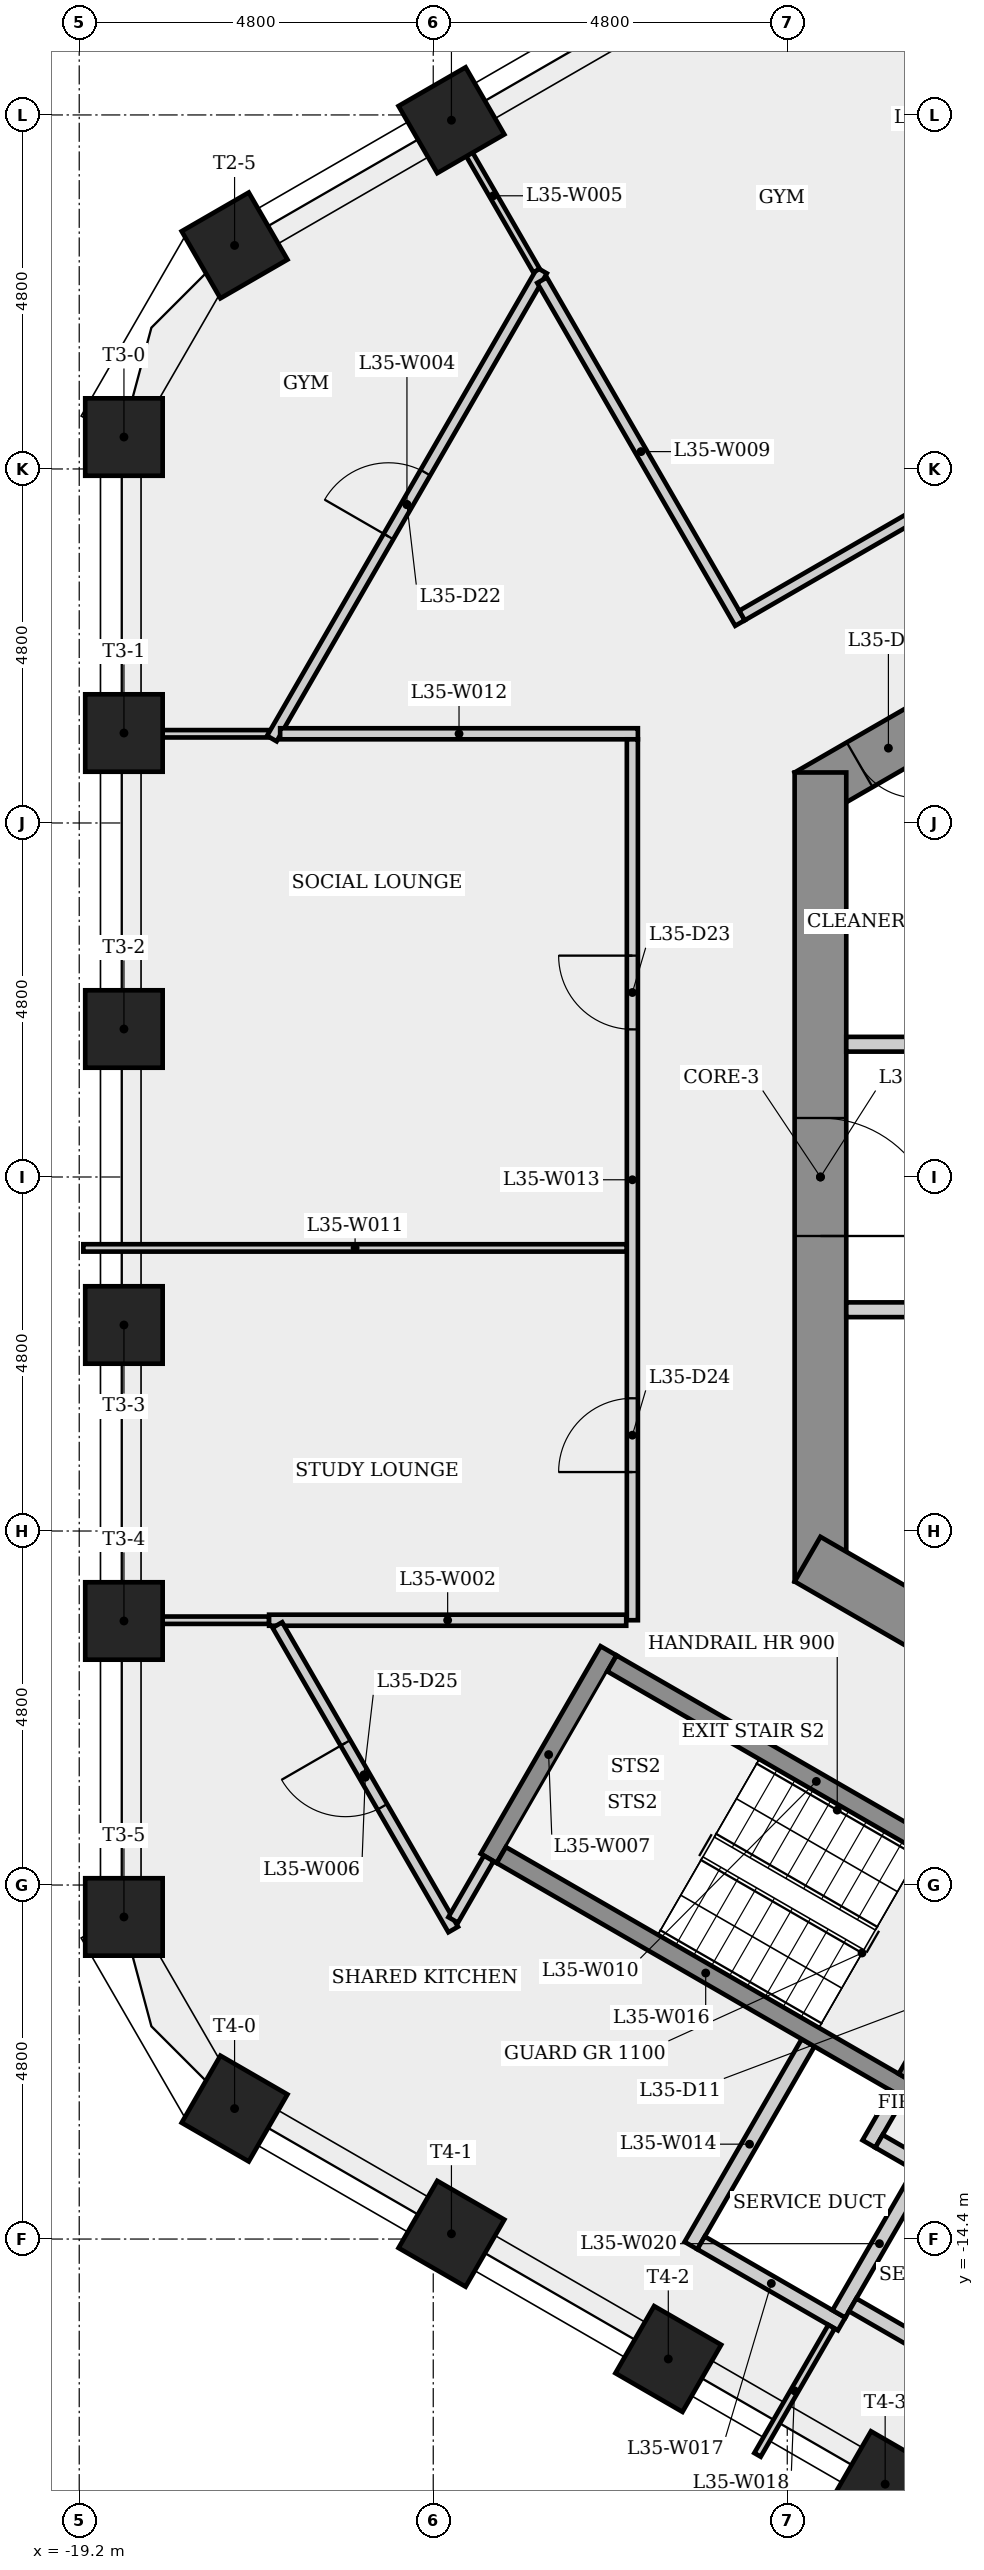
"""IFC4 building model, lengths in metres.
Left out: names, types, materials, properties, quantities, classifications, styles, units other than length and angle.
Written with IfcOpenShell. Run it as: python <this file> out.ifc"""

import sys

from ifc_helpers import new_model, si_unit, direction, frame, frame_2d, origin, origin_2d, place, context, subcontext, project, spatial, rectangle, extrude, element, fill, save


model = new_model("IFC4")
c1 = context("Model", 3, precision=1e-05, world=origin(), true_north=direction((0.0, 1.0)))
c2 = subcontext(c1, "Body", "Model", "MODEL_VIEW")
j1 = project(units=[si_unit("LENGTHUNIT", "METRE"), si_unit("PLANEANGLEUNIT", "RADIAN")], contexts=[c1])
p1 = place(None, origin())
s1 = spatial("IfcSite", under=j1, at=p1, CompositionType="ELEMENT")
p2 = place(p1, origin())
s2 = spatial("IfcBuilding", under=s1, at=p2, CompositionType="ELEMENT")
p3 = place(p2, frame((0.0, 0.0, 132.5)))
s3 = spatial("IfcBuildingStorey", under=s2, at=p3, CompositionType="ELEMENT", Elevation=132.5)
p4 = place(p3, frame((0.175, 10.667, 0.0), z_axis=(0.0, 0.0, 1.0), x_axis=(-0.866023993627, -0.500002442456, 0.0)))
e1 = element("IfcWall", 1, at=p4, inside=s3, PredefinedType="SHEAR", context=c2, shape_type="SweptSolid", body=[
    extrude(rectangle(XDim=10.97, YDim=0.7, at=frame_2d((5.485, 0.0))), origin(), (0.0, 0.0, 1.0), 3.4),
])
p5 = place(p4, frame((9.254, 0.0, 0.0)))
e2 = element("IfcOpeningElement", 2, at=p5, cuts=e1, PredefinedType="OPENING", context=c2, shape_type="SweptSolid", body=[
    extrude(rectangle(XDim=0.9, YDim=2.1, at=frame_2d((0.45, 1.05))), frame((0.0, 0.36, 0.0), z_axis=(0.0, -1.0, 0.0), x_axis=(1.0, 0.0, 0.0)), (0.0, 0.0, 1.0), 0.72),
])
p6 = place(p4, frame((2.033, 0.0, 0.0)))
e3 = element("IfcOpeningElement", 3, at=p6, cuts=e1, PredefinedType="OPENING", context=c2, shape_type="SweptSolid", body=[
    extrude(rectangle(XDim=0.9, YDim=2.1, at=frame_2d((0.45, 1.05))), frame((0.0, 0.36, 0.0), z_axis=(0.0, -1.0, 0.0), x_axis=(1.0, 0.0, 0.0)), (0.0, 0.0, 1.0), 0.72),
])
p7 = place(p3, frame((-9.15, 5.485, 0.0), z_axis=(0.0, 0.0, 1.0), x_axis=(0.0, -1.0, 0.0)))
e4 = element("IfcWall", 4, at=p7, inside=s3, PredefinedType="SHEAR", context=c2, shape_type="SweptSolid", body=[
    extrude(rectangle(XDim=10.97, YDim=0.7, at=frame_2d((5.485, 0.0))), origin(), (0.0, 0.0, 1.0), 3.4),
])
p8 = place(p7, frame((4.685, 0.0, 0.0)))
e5 = element("IfcOpeningElement", 5, at=p8, cuts=e4, PredefinedType="OPENING", context=c2, shape_type="SweptSolid", body=[
    extrude(rectangle(XDim=1.6, YDim=2.1, at=frame_2d((0.8, 1.05))), frame((0.0, 0.36, 0.0), z_axis=(0.0, -1.0, 0.0), x_axis=(1.0, 0.0, 0.0)), (0.0, 0.0, 1.0), 0.72),
])
p9 = place(p3, frame((-9.325, -5.182, 0.0), z_axis=(0.0, 0.0, 1.0), x_axis=(0.866023993627, -0.500002442456, 0.0)))
e6 = element("IfcWall", 6, at=p9, inside=s3, PredefinedType="SHEAR", context=c2, shape_type="SweptSolid", body=[
    extrude(rectangle(XDim=10.97, YDim=0.7, at=frame_2d((5.485, 0.0))), origin(), (0.0, 0.0, 1.0), 3.4),
])
p10 = place(p9, frame((2.239, 0.0, 0.0)))
e7 = element("IfcOpeningElement", 7, at=p10, cuts=e6, PredefinedType="OPENING", context=c2, shape_type="SweptSolid", body=[
    extrude(rectangle(XDim=0.9, YDim=2.1, at=frame_2d((0.45, 1.05))), frame((0.0, 0.36, 0.0), z_axis=(0.0, -1.0, 0.0), x_axis=(1.0, 0.0, 0.0)), (0.0, 0.0, 1.0), 0.72),
])
p11 = place(p9, frame((8.96, 0.0, 0.0)))
e8 = element("IfcOpeningElement", 8, at=p11, cuts=e6, PredefinedType="OPENING", context=c2, shape_type="SweptSolid", body=[
    extrude(rectangle(XDim=0.9, YDim=2.1, at=frame_2d((0.45, 1.05))), frame((0.0, 0.36, 0.0), z_axis=(0.0, -1.0, 0.0), x_axis=(1.0, 0.0, 0.0)), (0.0, 0.0, 1.0), 0.72),
])
for number, where, z_axis, x_axis in (
    (9, (-14.153, 14.329, 0.0), (0.0, 0.0, 1.0), (-0.5, 0.866, 0.0)),
    (10, (-17.094, 12.631, 0.0), (0.0, 0.0, 1.0), (-0.5, 0.866, 0.0)),
    (11, (-18.594, 10.033, 0.0), (0.0, 0.0, 1.0), (-1.0, 0.0, 0.0)),
    (12, (-18.594, 6.02, 0.0), (0.0, 0.0, 1.0), (-1.0, 0.0, 0.0)),
    (13, (-18.594, 2.007, 0.0), (0.0, 0.0, 1.0), (-1.0, 0.0, 0.0)),
    (14, (-18.594, -2.007, 0.0), (0.0, 0.0, 1.0), (-1.0, 0.0, 0.0)),
    (15, (-18.594, -6.02, 0.0), (0.0, 0.0, 1.0), (-1.0, 0.0, 0.0)),
    (16, (-18.594, -10.033, 0.0), (0.0, 0.0, 1.0), (-1.0, 0.0, 0.0)),
    (17, (-17.094, -12.631, 0.0), (0.0, 0.0, 1.0), (-0.5, -0.866, 0.0)),
    (18, (-14.153, -14.329, 0.0), (0.0, 0.0, 1.0), (-0.5, -0.866, 0.0)),
    (19, (-11.213, -16.026, 0.0), (0.0, 0.0, 1.0), (-0.5, -0.866, 0.0)),
    (20, (-8.273, -17.724, 0.0), (0.0, 0.0, 1.0), (-0.5, -0.866, 0.0)),
):
    element("IfcColumn", number, at=place(p3, frame(where, z_axis=z_axis, x_axis=x_axis)), inside=s3, PredefinedType="COLUMN", context=c2, shape_type="SweptSolid", body=[
        extrude(rectangle(XDim=1.05, YDim=1.05, at=origin_2d()), origin(), (0.0, 0.0, 1.0), 3.4),
    ])
p12 = place(p3, frame((-16.626, -6.01, 0.0), z_axis=(0.0, 0.0, 1.0), x_axis=(-1.0, 0.0, 0.0)))
e21 = element("IfcWall", 21, at=p12, inside=s3, PredefinedType="PARTITIONING", context=c2, shape_type="SweptSolid", body=[
    extrude(rectangle(XDim=1.998, YDim=0.1, at=frame_2d((0.999, 0.0))), origin(), (0.0, 0.0, 1.0), 3.0),
])
p13 = place(p3, frame((-16.626, -6.01, 0.0), z_axis=(0.0, 0.0, 1.0), x_axis=(1.0, 0.0, 0.0)))
e22 = element("IfcWall", 22, at=p13, inside=s3, PredefinedType="PARTITIONING", context=c2, shape_type="SweptSolid", body=[
    extrude(rectangle(XDim=4.842, YDim=0.15, at=frame_2d((2.421, 0.0))), origin(), (0.0, 0.0, 1.0), 3.0),
])
p14 = place(p3, frame((-16.626, 6.01, 0.0), z_axis=(0.0, 0.0, 1.0), x_axis=(-1.0, 0.0, 0.0)))
e23 = element("IfcWall", 23, at=p14, inside=s3, PredefinedType="PARTITIONING", context=c2, shape_type="SweptSolid", body=[
    extrude(rectangle(XDim=1.998, YDim=0.1, at=frame_2d((0.999, 0.0))), origin(), (0.0, 0.0, 1.0), 3.0),
])
p15 = place(p3, frame((-16.588, 5.945, 0.0), z_axis=(0.0, 0.0, 1.0), x_axis=(0.500006094381, 0.866021885163, 0.0)))
e24 = element("IfcWall", 24, at=p15, inside=s3, PredefinedType="PARTITIONING", context=c2, shape_type="SweptSolid", body=[
    extrude(rectangle(XDim=7.327, YDim=0.15, at=frame_2d((3.663, 0.0))), origin(), (0.0, 0.0, 1.0), 3.0),
])
p16 = place(p15, frame((3.163, 0.0, 0.0)))
e25 = element("IfcOpeningElement", 25, at=p16, cuts=e24, PredefinedType="OPENING", context=c2, shape_type="SweptSolid", body=[
    extrude(rectangle(XDim=1.0, YDim=2.1, at=frame_2d((0.5, 1.05))), frame((0.0, 0.085, 0.0), z_axis=(0.0, -1.0, 0.0), x_axis=(1.0, 0.0, 0.0)), (0.0, 0.0, 1.0), 0.17),
])
p17 = place(p3, frame((-14.171, 14.318, 0.0), z_axis=(0.0, 0.0, 1.0), x_axis=(0.500017137554, -0.866015509187, 0.0)))
e26 = element("IfcWall", 26, at=p17, inside=s3, PredefinedType="PARTITIONING", context=c2, shape_type="SweptSolid", body=[
    extrude(rectangle(XDim=2.343, YDim=0.1, at=frame_2d((1.171, 0.0))), origin(), (0.0, 0.0, 1.0), 3.0),
])
p18 = place(p3, frame((-14.13, -10.203, 0.0), z_axis=(0.0, 0.0, 1.0), x_axis=(-0.500000266875, 0.866025249704, 0.0)))
e27 = element("IfcWall", 27, at=p18, inside=s3, PredefinedType="PARTITIONING", context=c2, shape_type="SweptSolid", body=[
    extrude(rectangle(XDim=4.767, YDim=0.15, at=frame_2d((2.384, 0.0))), origin(), (0.0, 0.0, 1.0), 3.0),
])
p19 = place(p18, frame((1.921, 0.0, 0.0)))
e28 = element("IfcOpeningElement", 28, at=p19, cuts=e27, PredefinedType="OPENING", context=c2, shape_type="SweptSolid", body=[
    extrude(rectangle(XDim=1.0, YDim=2.1, at=frame_2d((0.5, 1.05))), frame((0.0, 0.085, 0.0), z_axis=(0.0, -1.0, 0.0), x_axis=(1.0, 0.0, 0.0)), (0.0, 0.0, 1.0), 0.17),
])
p20 = place(p3, frame((-13.648, -9.239, 0.0), z_axis=(0.0, 0.0, 1.0), x_axis=(0.500017246033, 0.866015446554, 0.0)))
e29 = element("IfcWall", 29, at=p20, inside=s3, PredefinedType="SHEAR", context=c2, shape_type="SweptSolid", body=[
    extrude(rectangle(XDim=3.25, YDim=0.25, at=frame_2d((1.625, 0.0))), origin(), (0.0, 0.0, 1.0), 3.0),
])
p21 = place(p3, frame((-13.648, -9.239, 0.0), z_axis=(0.0, 0.0, 1.0), x_axis=(-0.500226934229, -0.865894343596, 0.0)))
e30 = element("IfcWall", 30, at=p21, inside=s3, PredefinedType="PARTITIONING", context=c2, shape_type="SweptSolid", body=[
    extrude(rectangle(XDim=0.963, YDim=0.15, at=frame_2d((0.482, 0.0))), origin(), (0.0, 0.0, 1.0), 3.0),
])
p22 = place(p3, frame((-12.925, 12.16, 0.0), z_axis=(0.0, 0.0, 1.0), x_axis=(0.500022974468, -0.866012139063, 0.0)))
e31 = element("IfcWall", 31, at=p22, inside=s3, PredefinedType="PARTITIONING", context=c2, shape_type="SweptSolid", body=[
    extrude(rectangle(XDim=5.368, YDim=0.15, at=frame_2d((2.684, 0.0))), origin(), (0.0, 0.0, 1.0), 3.0),
])
p23 = place(p3, frame((-11.977, -6.595, 0.0), z_axis=(0.0, 0.0, 1.0), x_axis=(0.866025499775, -0.499999833739, 0.0)))
e32 = element("IfcWall", 32, at=p23, inside=s3, PredefinedType="SHEAR", context=c2, shape_type="SweptSolid", body=[
    extrude(rectangle(XDim=6.4, YDim=0.25, at=frame_2d((3.2, 0.0))), origin(), (0.0, 0.0, 1.0), 3.0),
])
p24 = place(p23, frame((5.025, 0.0, 0.0)))
e33 = element("IfcOpeningElement", 33, at=p24, cuts=e32, PredefinedType="OPENING", context=c2, shape_type="SweptSolid", body=[
    extrude(rectangle(XDim=1.0, YDim=2.1, at=frame_2d((0.5, 1.05))), frame((0.0, 0.135, 0.0), z_axis=(0.0, -1.0, 0.0), x_axis=(1.0, 0.0, 0.0)), (0.0, 0.0, 1.0), 0.27),
])
p25 = place(p3, frame((-11.775, -0.961, 0.0), z_axis=(0.0, 0.0, 1.0), x_axis=(-1.0, 0.0, 0.0)))
e34 = element("IfcWall", 34, at=p25, inside=s3, PredefinedType="PARTITIONING", context=c2, shape_type="SweptSolid", body=[
    extrude(rectangle(XDim=7.369, YDim=0.1, at=frame_2d((3.685, 0.0))), origin(), (0.0, 0.0, 1.0), 3.0),
])
p26 = place(p3, frame((-11.625, 6.01, 0.0), z_axis=(0.0, 0.0, 1.0), x_axis=(-1.0, 0.0, 0.0)))
e35 = element("IfcWall", 35, at=p26, inside=s3, PredefinedType="PARTITIONING", context=c2, shape_type="SweptSolid", body=[
    extrude(rectangle(XDim=4.851, YDim=0.15, at=frame_2d((2.425, 0.0))), origin(), (0.0, 0.0, 1.0), 3.0),
])
p27 = place(p3, frame((-11.7, -6.01, 0.0), z_axis=(0.0, 0.0, 1.0), x_axis=(0.0, 1.0, 0.0)))
e36 = element("IfcWall", 36, at=p27, inside=s3, PredefinedType="PARTITIONING", context=c2, shape_type="SweptSolid", body=[
    extrude(rectangle(XDim=11.944, YDim=0.15, at=frame_2d((5.972, 0.0))), origin(), (0.0, 0.0, 1.0), 3.0),
])
p28 = place(p27, frame((8.011, 0.0, 0.0)))
e37 = element("IfcOpeningElement", 37, at=p28, cuts=e36, PredefinedType="OPENING", context=c2, shape_type="SweptSolid", body=[
    extrude(rectangle(XDim=1.0, YDim=2.1, at=frame_2d((0.5, 1.05))), frame((0.0, 0.085, 0.0), z_axis=(0.0, -1.0, 0.0), x_axis=(1.0, 0.0, 0.0)), (0.0, 0.0, 1.0), 0.17),
])
p29 = place(p27, frame((2.009, 0.0, 0.0)))
e38 = element("IfcOpeningElement", 38, at=p29, cuts=e36, PredefinedType="OPENING", context=c2, shape_type="SweptSolid", body=[
    extrude(rectangle(XDim=1.0, YDim=2.1, at=frame_2d((0.5, 1.05))), frame((0.0, 0.085, 0.0), z_axis=(0.0, -1.0, 0.0), x_axis=(1.0, 0.0, 0.0)), (0.0, 0.0, 1.0), 0.17),
])
p30 = place(p3, frame((-10.905, -14.489, 0.0), z_axis=(0.0, 0.0, 1.0), x_axis=(0.499959856469, 0.866048579423, 0.0)))
e39 = element("IfcWall", 39, at=p30, inside=s3, PredefinedType="PLUMBINGWALL", context=c2, shape_type="SweptSolid", body=[
    extrude(rectangle(XDim=3.175, YDim=0.2, at=frame_2d((1.587, 0.0))), origin(), (0.0, 0.0, 1.0), 3.0),
])
p31 = place(p3, frame((-10.213, 7.613, 0.0), z_axis=(0.0, 0.0, 1.0), x_axis=(0.866020604402, 0.500008312683, 0.0)))
e40 = element("IfcWall", 40, at=p31, inside=s3, PredefinedType="PARTITIONING", context=c2, shape_type="SweptSolid", body=[
    extrude(rectangle(XDim=10.227, YDim=0.15, at=frame_2d((5.113, 0.0))), origin(), (0.0, 0.0, 1.0), 3.0),
])
p32 = place(p31, frame((2.822, 0.0, 0.0)))
e41 = element("IfcOpeningElement", 41, at=p32, cuts=e40, PredefinedType="OPENING", context=c2, shape_type="SweptSolid", body=[
    extrude(rectangle(XDim=1.0, YDim=2.1, at=frame_2d((0.5, 1.05))), frame((0.0, 0.085, 0.0), z_axis=(0.0, -1.0, 0.0), x_axis=(1.0, 0.0, 0.0)), (0.0, 0.0, 1.0), 0.17),
])
p33 = place(p3, frame((-13.477, -9.193, 0.0), z_axis=(0.0, 0.0, 1.0), x_axis=(0.866025499775, -0.499999833739, 0.0)))
e42 = element("IfcWall", 42, at=p33, inside=s3, PredefinedType="SHEAR", context=c2, shape_type="SweptSolid", body=[
    extrude(rectangle(XDim=6.4, YDim=0.25, at=frame_2d((3.2, 0.0))), origin(), (0.0, 0.0, 1.0), 3.0),
])
p34 = place(p3, frame((-8.863, -15.552, 0.0), z_axis=(0.0, 0.0, 1.0), x_axis=(-0.866035918664, 0.499981787252, 0.0)))
e43 = element("IfcWall", 43, at=p34, inside=s3, PredefinedType="PLUMBINGWALL", context=c2, shape_type="SweptSolid", body=[
    extrude(rectangle(XDim=2.2, YDim=0.2, at=frame_2d((1.1, 0.0))), origin(), (0.0, 0.0, 1.0), 3.0),
])
p35 = place(p3, frame((-9.0, -15.588, 0.0), z_axis=(0.0, 0.0, 1.0), x_axis=(-0.500038395149, -0.8660032352, 0.0)))
e44 = element("IfcWall", 44, at=p35, inside=s3, PredefinedType="PARTITIONING", context=c2, shape_type="SweptSolid", body=[
    extrude(rectangle(XDim=2.007, YDim=0.1, at=frame_2d((1.003, 0.0))), origin(), (0.0, 0.0, 1.0), 3.0),
])
p36 = place(p3, frame((-8.8, 1.8, 0.0), z_axis=(0.0, 0.0, 1.0), x_axis=(1.0, 0.0, 0.0)))
e45 = element("IfcWall", 45, at=p36, inside=s3, PredefinedType="PARTITIONING", context=c2, shape_type="SweptSolid", body=[
    extrude(rectangle(XDim=1.325, YDim=0.2, at=frame_2d((0.663, 0.0))), origin(), (0.0, 0.0, 1.0), 3.0),
])
p37 = place(p3, frame((-8.9, -15.415, 0.0), z_axis=(0.0, 0.0, 1.0), x_axis=(0.499946605688, 0.86605622881, 0.0)))
e46 = element("IfcWall", 46, at=p37, inside=s3, PredefinedType="PLUMBINGWALL", context=c2, shape_type="SweptSolid", body=[
    extrude(rectangle(XDim=2.2, YDim=0.2, at=frame_2d((1.1, 0.0))), origin(), (0.0, 0.0, 1.0), 3.0),
])
p38 = place(p3, frame((-8.493, -13.11, 0.0), z_axis=(0.0, 0.0, 1.0), x_axis=(0.500067724834, 0.865986299303, 0.0)))
e47 = element("IfcWall", 47, at=p38, inside=s3, PredefinedType="PLUMBINGWALL", context=c2, shape_type="SweptSolid", body=[
    extrude(rectangle(XDim=0.775, YDim=0.2, at=frame_2d((0.388, 0.0))), origin(), (0.0, 0.0, 1.0), 3.0),
])
p39 = place(p3, frame((-8.356, -13.073, 0.0), z_axis=(0.0, 0.0, 1.0), x_axis=(0.866031096941, -0.499990139034, 0.0)))
e48 = element("IfcWall", 48, at=p39, inside=s3, PredefinedType="PLUMBINGWALL", context=c2, shape_type="SweptSolid", body=[
    extrude(rectangle(XDim=3.0, YDim=0.2, at=frame_2d((1.5, 0.0))), origin(), (0.0, 0.0, 1.0), 3.0),
])
p40 = place(p3, frame((-7.475, -1.8, 0.0), z_axis=(0.0, 0.0, 1.0), x_axis=(-1.0, 0.0, 0.0)))
e49 = element("IfcWall", 49, at=p40, inside=s3, PredefinedType="PARTITIONING", context=c2, shape_type="SweptSolid", body=[
    extrude(rectangle(XDim=1.325, YDim=0.2, at=frame_2d((0.663, 0.0))), origin(), (0.0, 0.0, 1.0), 3.0),
])
p41 = place(p3, frame((-6.808, -16.392, 0.0), z_axis=(0.0, 0.0, 1.0), x_axis=(-0.866008176907, 0.50002983664, 0.0)))
e50 = element("IfcWall", 50, at=p41, inside=s3, PredefinedType="PLUMBINGWALL", context=c2, shape_type="SweptSolid", body=[
    extrude(rectangle(XDim=2.2, YDim=0.2, at=frame_2d((1.1, 0.0))), origin(), (0.0, 0.0, 1.0), 3.0),
])
p42 = place(p3, frame((-6.605, -9.841, 0.0), z_axis=(0.0, 0.0, 1.0), x_axis=(-0.499996545922, -0.866027397988, 0.0)))
e51 = element("IfcWall", 51, at=p42, inside=s3, PredefinedType="SHEAR", context=c2, shape_type="SweptSolid", body=[
    extrude(rectangle(XDim=2.75, YDim=0.25, at=frame_2d((1.375, 0.0))), origin(), (0.0, 0.0, 1.0), 3.0),
])
p43 = place(p42, frame((0.875, 0.0, 0.0)))
e52 = element("IfcOpeningElement", 52, at=p43, cuts=e51, PredefinedType="OPENING", context=c2, shape_type="SweptSolid", body=[
    extrude(rectangle(XDim=1.0, YDim=2.1, at=frame_2d((0.5, 1.05))), frame((0.0, 0.135, 0.0), z_axis=(0.0, -1.0, 0.0), x_axis=(1.0, 0.0, 0.0)), (0.0, 0.0, 1.0), 0.27),
])
p44 = place(p3, frame((-4.47, 11.016, 0.0), z_axis=(0.0, 0.0, 1.0), x_axis=(-0.499997453958, 0.866026873738, 0.0)))
e53 = element("IfcWall", 53, at=p44, inside=s3, PredefinedType="PARTITIONING", context=c2, shape_type="SweptSolid", body=[
    extrude(rectangle(XDim=7.71, YDim=0.1, at=frame_2d((3.855, 0.0))), origin(), (0.0, 0.0, 1.0), 3.0),
])
p45 = place(p16, origin())
e54 = element("IfcDoor", 54, at=p45, inside=s3, OperationType="SINGLE_SWING_LEFT", PredefinedType="DOOR", context=c2, shape_type="SweptSolid", body=[
    extrude(rectangle(XDim=1.0, YDim=2.1, at=frame_2d((0.5, 1.05))), frame((0.0, 0.025, 0.0), z_axis=(0.0, -1.0, 0.0), x_axis=(1.0, 0.0, 0.0)), (0.0, 0.0, 1.0), 0.05),
])
fill(e25, e54)
p46 = place(p28, origin())
e55 = element("IfcDoor", 55, at=p46, inside=s3, OperationType="SINGLE_SWING_RIGHT", PredefinedType="DOOR", context=c2, shape_type="SweptSolid", body=[
    extrude(rectangle(XDim=1.0, YDim=2.1, at=frame_2d((0.5, 1.05))), frame((0.0, 0.025, 0.0), z_axis=(0.0, -1.0, 0.0), x_axis=(1.0, 0.0, 0.0)), (0.0, 0.0, 1.0), 0.05),
])
fill(e37, e55)
p47 = place(p29, origin())
e56 = element("IfcDoor", 56, at=p47, inside=s3, OperationType="SINGLE_SWING_LEFT", PredefinedType="DOOR", context=c2, shape_type="SweptSolid", body=[
    extrude(rectangle(XDim=1.0, YDim=2.1, at=frame_2d((0.5, 1.05))), frame((0.0, 0.025, 0.0), z_axis=(0.0, -1.0, 0.0), x_axis=(1.0, 0.0, 0.0)), (0.0, 0.0, 1.0), 0.05),
])
fill(e38, e56)
p48 = place(p19, origin())
e57 = element("IfcDoor", 57, at=p48, inside=s3, OperationType="SINGLE_SWING_RIGHT", PredefinedType="DOOR", context=c2, shape_type="SweptSolid", body=[
    extrude(rectangle(XDim=1.0, YDim=2.1, at=frame_2d((0.5, 1.05))), frame((0.0, 0.025, 0.0), z_axis=(0.0, -1.0, 0.0), x_axis=(1.0, 0.0, 0.0)), (0.0, 0.0, 1.0), 0.05),
])
fill(e28, e57)
p49 = place(p5, origin())
e58 = element("IfcDoor", 58, at=p49, inside=s3, OperationType="SINGLE_SWING_LEFT", PredefinedType="DOOR", context=c2, shape_type="SweptSolid", body=[
    extrude(rectangle(XDim=0.9, YDim=2.1, at=frame_2d((0.45, 1.05))), frame((0.0, 0.025, 0.0), z_axis=(0.0, -1.0, 0.0), x_axis=(1.0, 0.0, 0.0)), (0.0, 0.0, 1.0), 0.05),
])
fill(e2, e58)
p50 = place(p8, origin())
e59 = element("IfcDoor", 59, at=p50, inside=s3, OperationType="SINGLE_SWING_RIGHT", PredefinedType="DOOR", context=c2, shape_type="SweptSolid", body=[
    extrude(rectangle(XDim=1.6, YDim=2.1, at=frame_2d((0.8, 1.05))), frame((0.0, 0.025, 0.0), z_axis=(0.0, -1.0, 0.0), x_axis=(1.0, 0.0, 0.0)), (0.0, 0.0, 1.0), 0.05),
])
fill(e5, e59)
save(model, sys.argv[1])
